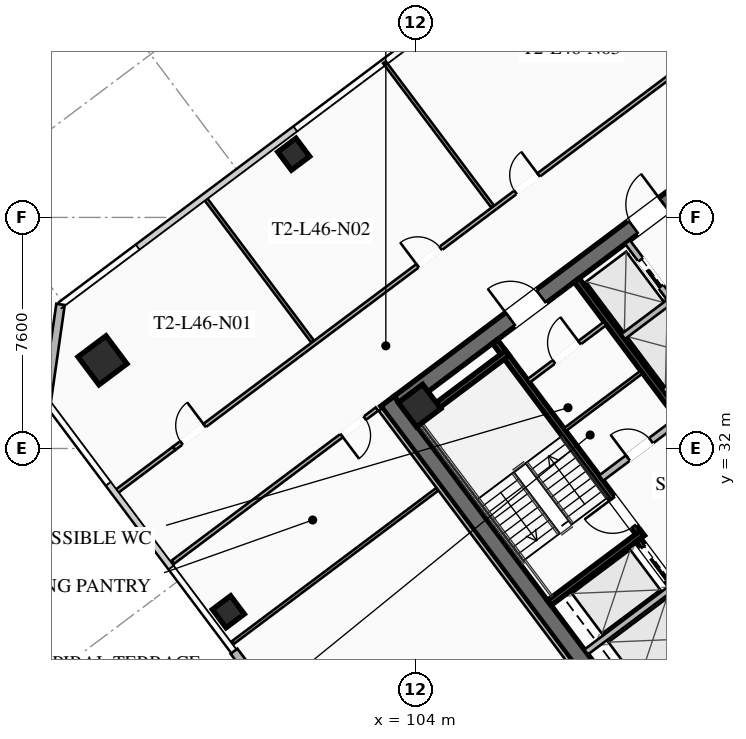
"""IFC4 building model, lengths in metres.
Left out: names, types, materials, properties, quantities, classifications, styles, units other than length and angle.
Written with IfcOpenShell. Run it as: python <this file> out.ifc"""

import sys

from ifc_helpers import new_model, si_unit, direction, frame, frame_2d, origin, origin_2d, place, context, subcontext, project, spatial, rectangle, hollow_rectangle, extrude, element, fill, save


model = new_model("IFC4")
c1 = context("Model", 3, precision=1e-05, world=origin(), true_north=direction((0.0, 1.0)))
c2 = subcontext(c1, "Body", "Model", "MODEL_VIEW")
j1 = project(units=[si_unit("LENGTHUNIT", "METRE"), si_unit("PLANEANGLEUNIT", "RADIAN")], contexts=[c1])
p1 = place(None, origin())
s1 = spatial("IfcSite", under=j1, at=p1, CompositionType="ELEMENT")
p2 = place(p1, origin())
s2 = spatial("IfcBuilding", under=s1, at=p2, CompositionType="ELEMENT")
p3 = place(p2, frame((0.0, 0.0, 171.2)))
s3 = spatial("IfcBuildingStorey", under=s2, at=p3, CompositionType="ELEMENT", Elevation=171.2)
p4 = place(p3, frame((112.436, 21.077, 0.0), z_axis=(0.0, 0.0, 1.0), x_axis=(-0.600005007985, 0.799996243986, 0.0)))
e1 = element("IfcWall", 1, at=p4, inside=s3, PredefinedType="SHEAR", context=c2, shape_type="SweptSolid", body=[
    extrude(rectangle(XDim=15.6, YDim=0.55, at=frame_2d((7.8, 0.0))), origin(), (0.0, 0.0, 1.0), 3.55),
])
p5 = place(p3, frame((103.461, 33.502, 0.0), z_axis=(0.0, 0.0, 1.0), x_axis=(0.799998054672, 0.600002593761, 0.0)))
e2 = element("IfcWall", 2, at=p5, inside=s3, PredefinedType="SHEAR", context=c2, shape_type="SweptSolid", body=[
    extrude(rectangle(XDim=15.06, YDim=0.55, at=frame_2d((7.53, 0.0))), origin(), (0.0, 0.0, 1.0), 3.55),
])
p6 = place(p5, frame((4.58, 0.0, 0.0)))
e3 = element("IfcOpeningElement", 3, at=p6, cuts=e2, PredefinedType="OPENING", context=c2, shape_type="SweptSolid", body=[
    extrude(rectangle(XDim=1.25, YDim=2.25, at=frame_2d((0.625, 1.125))), frame((0.0, 0.285, 0.0), z_axis=(0.0, -1.0, 0.0), x_axis=(1.0, 0.0, 0.0)), (0.0, 0.0, 1.0), 0.57),
])
p7 = place(p5, frame((9.63, 0.0, 0.0)))
e4 = element("IfcOpeningElement", 4, at=p7, cuts=e2, PredefinedType="OPENING", context=c2, shape_type="SweptSolid", body=[
    extrude(rectangle(XDim=1.25, YDim=2.25, at=frame_2d((0.625, 1.125))), frame((0.0, 0.285, 0.0), z_axis=(0.0, -1.0, 0.0), x_axis=(1.0, 0.0, 0.0)), (0.0, 0.0, 1.0), 0.57),
])
p8 = place(p3, frame((104.13, 33.41, 0.0), z_axis=(0.0, 0.0, 1.0), x_axis=(0.799999996291, 0.600000004945, 0.0)))
e5 = element("IfcColumn", 5, at=p8, inside=s3, PredefinedType="COLUMN", context=c2, shape_type="SweptSolid", body=[
    extrude(hollow_rectangle(XDim=1.0, YDim=1.0, WallThickness=0.04, at=origin_2d()), origin(), (0.0, 0.0, 1.0), 3.37),
])
p9 = place(p3, frame((93.7, 34.9, 0.0), z_axis=(0.0, 0.0, 1.0), x_axis=(0.799999996291, 0.600000004945, 0.0)))
e6 = element("IfcColumn", 6, at=p9, inside=s3, PredefinedType="COLUMN", context=c2, shape_type="SweptSolid", body=[
    extrude(hollow_rectangle(XDim=1.15, YDim=1.15, WallThickness=0.045, at=origin_2d()), origin(), (0.0, 0.0, 1.0), 3.37),
])
for number, where, z_axis, x_axis in (
    (7, (99.99, 41.68, 0.0), (0.0, 0.0, 1.0), (0.8, 0.6, 0.0)),
    (8, (97.84, 26.63, 0.0), (0.0, 0.0, 1.0), (0.8, 0.6, 0.0)),
):
    element("IfcColumn", number, at=place(p3, frame(where, z_axis=z_axis, x_axis=x_axis)), inside=s3, PredefinedType="COLUMN", context=c2, shape_type="SweptSolid", body=[
        extrude(hollow_rectangle(XDim=0.75, YDim=0.75, WallThickness=0.032, at=origin_2d()), origin(), (0.0, 0.0, 1.0), 3.37),
    ])
p10 = place(p3, frame((103.126, 18.532, 0.0), z_axis=(0.0, 0.0, 1.0), x_axis=(-0.600004595526, 0.799996553335, 0.0)))
e9 = element("IfcWall", 9, at=p10, inside=s3, PredefinedType="SOLIDWALL", context=c2, shape_type="SweptSolid", body=[
    extrude(rectangle(XDim=8.5, YDim=0.28, at=frame_2d((4.25, 0.0))), origin(), (0.0, 0.0, 1.0), 3.37),
])
p11 = place(p10, frame((3.6, 0.0, 0.0)))
e10 = element("IfcOpeningElement", 10, at=p11, cuts=e9, PredefinedType="OPENING", context=c2, shape_type="SweptSolid", body=[
    extrude(rectangle(XDim=1.3, YDim=2.15, at=frame_2d((0.65, 1.075))), frame((0.0, 0.15, 0.0), z_axis=(0.0, -1.0, 0.0), x_axis=(1.0, 0.0, 0.0)), (0.0, 0.0, 1.0), 0.3),
])
p12 = place(p10, frame((1.46, 0.0, 0.85)))
e11 = element("IfcOpeningElement", 11, at=p12, cuts=e9, PredefinedType="OPENING", context=c2, shape_type="SweptSolid", body=[
    extrude(rectangle(XDim=1.8, YDim=1.92, at=frame_2d((0.9, 0.96))), frame((0.0, 0.15, 0.0), z_axis=(0.0, -1.0, 0.0), x_axis=(1.0, 0.0, 0.0)), (0.0, 0.0, 1.0), 0.3),
])
p13 = place(p3, frame((91.86, 33.52, 0.0), z_axis=(0.0, 0.0, 1.0), x_axis=(0.141410847992, 0.989950994782, 0.0)))
e12 = element("IfcWall", 12, at=p13, inside=s3, PredefinedType="SOLIDWALL", context=c2, shape_type="SweptSolid", body=[
    extrude(rectangle(XDim=3.253, YDim=0.28, at=frame_2d((1.626, 0.0))), origin(), (0.0, 0.0, 1.0), 3.37),
])
p14 = place(p3, frame((111.44, 29.08, 0.0), z_axis=(0.0, 0.0, 1.0), x_axis=(-0.59999029481, 0.8000072788, 0.0)))
e13 = element("IfcWall", 13, at=p14, inside=s3, PredefinedType="SHEAR", context=c2, shape_type="SweptSolid", body=[
    extrude(rectangle(XDim=8.05, YDim=0.2, at=frame_2d((4.025, 0.0))), origin(), (0.0, 0.0, 1.0), 3.37),
])
p15 = place(p14, frame((0.45, 0.0, 0.0)))
e14 = element("IfcOpeningElement", 14, at=p15, cuts=e13, PredefinedType="OPENING", context=c2, shape_type="SweptSolid", body=[
    extrude(rectangle(XDim=1.15, YDim=2.2, at=frame_2d((0.575, 1.1))), frame((0.0, 0.11, 0.0), z_axis=(0.0, -1.0, 0.0), x_axis=(1.0, 0.0, 0.0)), (0.0, 0.0, 1.0), 0.22),
])
for number, where, z_axis, x_axis in (
    (15, (108.396, 26.922, 0.0), (0.0, 0.0, 1.0), (0.8, 0.6, 0.0)),
    (16, (103.956, 32.842, 0.0), (0.0, 0.0, 1.0), (0.8, 0.6, 0.0)),
):
    element("IfcWall", number, at=place(p3, frame(where, z_axis=z_axis, x_axis=x_axis)), inside=s3, PredefinedType="SHEAR", context=c2, shape_type="SweptSolid", body=[
        extrude(rectangle(XDim=3.83, YDim=0.2, at=frame_2d((1.915, 0.0))), origin(), (0.0, 0.0, 1.0), 3.37),
    ])
p16 = place(p3, frame((117.998, 25.936, 0.0), z_axis=(0.0, 0.0, 1.0), x_axis=(-0.600002693989, 0.799997979501, 0.0)))
e17 = element("IfcWall", 17, at=p16, inside=s3, PredefinedType="SHEAR", context=c2, shape_type="SweptSolid", body=[
    extrude(rectangle(XDim=14.5, YDim=0.2, at=frame_2d((7.25, 0.0))), origin(), (0.0, 0.0, 1.0), 3.37),
])
p17 = place(p3, frame((110.104, 31.028, 0.0), z_axis=(0.0, 0.0, 1.0), x_axis=(0.800018601094, 0.59997519774, 0.0)))
e18 = element("IfcWall", 18, at=p17, inside=s3, PredefinedType="SOLIDWALL", context=c2, shape_type="SweptSolid", body=[
    extrude(rectangle(XDim=3.15, YDim=0.22, at=frame_2d((1.575, 0.0))), origin(), (0.0, 0.0, 1.0), 2.723),
])
p18 = place(p17, frame((1.1, 0.0, 0.0)))
e19 = element("IfcOpeningElement", 19, at=p18, cuts=e18, PredefinedType="OPENING", context=c2, shape_type="SweptSolid", body=[
    extrude(rectangle(XDim=0.95, YDim=2.05, at=frame_2d((0.475, 1.025))), frame((0.0, 0.12, 0.0), z_axis=(0.0, -1.0, 0.0), x_axis=(1.0, 0.0, 0.0)), (0.0, 0.0, 1.0), 0.24),
])
p19 = place(p3, frame((115.19, 23.83, 0.0), z_axis=(0.0, 0.0, 1.0), x_axis=(-0.599993943644, 0.800004542231, 0.0)))
e20 = element("IfcWall", 20, at=p19, inside=s3, PredefinedType="SHEAR", context=c2, shape_type="SweptSolid", body=[
    extrude(rectangle(XDim=6.45, YDim=0.2, at=frame_2d((3.225, 0.0))), origin(), (0.0, 0.0, 1.0), 3.37),
])
p20 = place(p19, frame((4.875, 0.0, 0.0)))
e21 = element("IfcOpeningElement", 21, at=p20, cuts=e20, PredefinedType="OPENING", context=c2, shape_type="SweptSolid", body=[
    extrude(rectangle(XDim=1.3, YDim=2.25, at=frame_2d((0.65, 1.125))), frame((0.0, 0.11, 0.0), z_axis=(0.0, -1.0, 0.0), x_axis=(1.0, 0.0, 0.0)), (0.0, 0.0, 1.0), 0.22),
])
p21 = place(p19, frame((2.875, 0.0, 0.0)))
e22 = element("IfcOpeningElement", 22, at=p21, cuts=e20, PredefinedType="OPENING", context=c2, shape_type="SweptSolid", body=[
    extrude(rectangle(XDim=1.3, YDim=2.25, at=frame_2d((0.65, 1.125))), frame((0.0, 0.11, 0.0), z_axis=(0.0, -1.0, 0.0), x_axis=(1.0, 0.0, 0.0)), (0.0, 0.0, 1.0), 0.22),
])
p22 = place(p19, frame((0.675, 0.0, 0.0)))
e23 = element("IfcOpeningElement", 23, at=p22, cuts=e20, PredefinedType="OPENING", context=c2, shape_type="SweptSolid", body=[
    extrude(rectangle(XDim=1.3, YDim=2.25, at=frame_2d((0.65, 1.125))), frame((0.0, 0.11, 0.0), z_axis=(0.0, -1.0, 0.0), x_axis=(1.0, 0.0, 0.0)), (0.0, 0.0, 1.0), 0.22),
])
for number, where, z_axis, x_axis in (
    (24, (110.826, 23.682, 0.0), (0.0, 0.0, 1.0), (0.8, 0.6, 0.0)),
    (25, (109.608, 25.306, 0.0), (0.0, 0.0, 1.0), (0.8, 0.6, 0.0)),
):
    element("IfcWall", number, at=place(p3, frame(where, z_axis=z_axis, x_axis=x_axis)), inside=s3, PredefinedType="SOLIDWALL", context=c2, shape_type="SweptSolid", body=[
        extrude(rectangle(XDim=3.48, YDim=0.2, at=frame_2d((1.74, 0.0))), origin(), (0.0, 0.0, 1.0), 3.37),
    ])
p23 = place(p3, frame((107.71, 34.22, 0.0), z_axis=(0.0, 0.0, 1.0), x_axis=(0.799981399002, 0.60002480053, 0.0)))
e26 = element("IfcWall", 26, at=p23, inside=s3, PredefinedType="PARTITIONING", context=c2, shape_type="SweptSolid", body=[
    extrude(rectangle(XDim=3.15, YDim=0.135, at=frame_2d((1.575, 0.0))), origin(), (0.0, 0.0, 1.0), 2.723),
])
p24 = place(p23, frame((1.05, 0.0, 0.0)))
e27 = element("IfcOpeningElement", 27, at=p24, cuts=e26, PredefinedType="OPENING", context=c2, shape_type="SweptSolid", body=[
    extrude(rectangle(XDim=1.05, YDim=2.2, at=frame_2d((0.525, 1.1))), frame((0.0, 0.077, 0.0), z_axis=(0.0, -1.0, 0.0), x_axis=(1.0, 0.0, 0.0)), (0.0, 0.0, 1.0), 0.155),
])
p25 = place(p3, frame((108.91, 32.62, 0.0), z_axis=(0.0, 0.0, 1.0), x_axis=(0.800018601094, 0.59997519774, 0.0)))
e28 = element("IfcWall", 28, at=p25, inside=s3, PredefinedType="PARTITIONING", context=c2, shape_type="SweptSolid", body=[
    extrude(rectangle(XDim=3.15, YDim=0.11, at=frame_2d((1.575, 0.0))), origin(), (0.0, 0.0, 1.0), 2.723),
])
p26 = place(p3, frame((115.11, 33.27, 0.0), z_axis=(0.0, 0.0, 1.0), x_axis=(-0.600011322243, 0.799991508192, 0.0)))
e29 = element("IfcWall", 29, at=p26, inside=s3, PredefinedType="SOLIDWALL", context=c2, shape_type="SweptSolid", body=[
    extrude(rectangle(XDim=6.9, YDim=0.2, at=frame_2d((3.45, 0.0))), origin(), (0.0, 0.0, 1.0), 3.37),
])
p27 = place(p26, frame((0.575, 0.0, 0.0)))
e30 = element("IfcOpeningElement", 30, at=p27, cuts=e29, PredefinedType="OPENING", context=c2, shape_type="SweptSolid", body=[
    extrude(rectangle(XDim=1.1, YDim=2.2, at=frame_2d((0.55, 1.1))), frame((0.0, 0.11, 0.0), z_axis=(0.0, -1.0, 0.0), x_axis=(1.0, 0.0, 0.0)), (0.0, 0.0, 1.0), 0.22),
])
p28 = place(p26, frame((2.825, 0.0, 0.0)))
e31 = element("IfcOpeningElement", 31, at=p28, cuts=e29, PredefinedType="OPENING", context=c2, shape_type="SweptSolid", body=[
    extrude(rectangle(XDim=1.1, YDim=2.2, at=frame_2d((0.55, 1.1))), frame((0.0, 0.11, 0.0), z_axis=(0.0, -1.0, 0.0), x_axis=(1.0, 0.0, 0.0)), (0.0, 0.0, 1.0), 0.22),
])
p29 = place(p26, frame((5.075, 0.0, 0.0)))
e32 = element("IfcOpeningElement", 32, at=p29, cuts=e29, PredefinedType="OPENING", context=c2, shape_type="SweptSolid", body=[
    extrude(rectangle(XDim=1.1, YDim=2.2, at=frame_2d((0.55, 1.1))), frame((0.0, 0.11, 0.0), z_axis=(0.0, -1.0, 0.0), x_axis=(1.0, 0.0, 0.0)), (0.0, 0.0, 1.0), 0.22),
])
p30 = place(p3, frame((112.176, 33.882, 0.0), z_axis=(0.0, 0.0, 1.0), x_axis=(0.8, 0.6, 0.0)))
e33 = element("IfcWall", 33, at=p30, inside=s3, PredefinedType="SOLIDWALL", context=c2, shape_type="SweptSolid", body=[
    extrude(rectangle(XDim=1.88, YDim=0.2, at=frame_2d((0.94, 0.0))), origin(), (0.0, 0.0, 1.0), 3.37),
])
p31 = place(p3, frame((110.826, 35.682, 0.0), z_axis=(0.0, 0.0, 1.0), x_axis=(0.799984418148, 0.600020775241, 0.0)))
e34 = element("IfcWall", 34, at=p31, inside=s3, PredefinedType="SOLIDWALL", context=c2, shape_type="SweptSolid", body=[
    extrude(rectangle(XDim=1.88, YDim=0.2, at=frame_2d((0.94, 0.0))), origin(), (0.0, 0.0, 1.0), 3.37),
])
p32 = place(p3, frame((96.058, 32.006, 0.0), z_axis=(0.0, 0.0, 1.0), x_axis=(0.8, 0.6, 0.0)))
e35 = element("IfcWall", 35, at=p32, inside=s3, PredefinedType="PARTITIONING", context=c2, shape_type="SweptSolid", body=[
    extrude(rectangle(XDim=28.7, YDim=0.135, at=frame_2d((14.35, 0.0))), origin(), (0.0, 0.0, 1.0), 2.723),
])
p33 = place(p32, frame((0.3, 0.0, 0.0)))
e36 = element("IfcOpeningElement", 36, at=p33, cuts=e35, PredefinedType="OPENING", context=c2, shape_type="SweptSolid", body=[
    extrude(rectangle(XDim=0.95, YDim=2.05, at=frame_2d((0.475, 1.025))), frame((0.0, 0.077, 0.0), z_axis=(0.0, -1.0, 0.0), x_axis=(1.0, 0.0, 0.0)), (0.0, 0.0, 1.0), 0.155),
])
p34 = place(p32, frame((10.01, 0.0, 0.0)))
e37 = element("IfcOpeningElement", 37, at=p34, cuts=e35, PredefinedType="OPENING", context=c2, shape_type="SweptSolid", body=[
    extrude(rectangle(XDim=0.95, YDim=2.05, at=frame_2d((0.475, 1.025))), frame((0.0, 0.077, 0.0), z_axis=(0.0, -1.0, 0.0), x_axis=(1.0, 0.0, 0.0)), (0.0, 0.0, 1.0), 0.155),
])
p35 = place(p32, frame((14.033, 0.0, 0.0)))
e38 = element("IfcOpeningElement", 38, at=p35, cuts=e35, PredefinedType="OPENING", context=c2, shape_type="SweptSolid", body=[
    extrude(rectangle(XDim=0.95, YDim=2.05, at=frame_2d((0.475, 1.025))), frame((0.0, 0.077, 0.0), z_axis=(0.0, -1.0, 0.0), x_axis=(1.0, 0.0, 0.0)), (0.0, 0.0, 1.0), 0.155),
])
p36 = place(p32, frame((27.45, 0.0, 0.0)))
e39 = element("IfcOpeningElement", 39, at=p36, cuts=e35, PredefinedType="OPENING", context=c2, shape_type="SweptSolid", body=[
    extrude(rectangle(XDim=0.95, YDim=2.05, at=frame_2d((0.475, 1.025))), frame((0.0, 0.077, 0.0), z_axis=(0.0, -1.0, 0.0), x_axis=(1.0, 0.0, 0.0)), (0.0, 0.0, 1.0), 0.155),
])
p37 = place(p3, frame((94.114, 30.548, 0.0), z_axis=(0.0, 0.0, 1.0), x_axis=(0.800012055778, 0.599983925293, 0.0)))
e40 = element("IfcWall", 40, at=p37, inside=s3, PredefinedType="PARTITIONING", context=c2, shape_type="SweptSolid", body=[
    extrude(rectangle(XDim=2.43, YDim=0.135, at=frame_2d((1.215, 0.0))), origin(), (0.0, 0.0, 1.0), 2.723),
])
p38 = place(p3, frame((100.61, 35.52, 0.0), z_axis=(0.0, 0.0, 1.0), x_axis=(-0.600019761686, 0.799985178354, 0.0)))
e41 = element("IfcWall", 41, at=p38, inside=s3, PredefinedType="PARTITIONING", context=c2, shape_type="SweptSolid", body=[
    extrude(rectangle(XDim=5.93, YDim=0.11, at=frame_2d((2.965, 0.0))), origin(), (0.0, 0.0, 1.0), 2.723),
])
p39 = place(p3, frame((106.53, 39.96, 0.0), z_axis=(0.0, 0.0, 1.0), x_axis=(-0.6, 0.8, 0.0)))
e42 = element("IfcWall", 42, at=p39, inside=s3, PredefinedType="PARTITIONING", context=c2, shape_type="SweptSolid", body=[
    extrude(rectangle(XDim=5.93, YDim=0.11, at=frame_2d((2.965, 0.0))), origin(), (0.0, 0.0, 1.0), 2.723),
])
p40 = place(p3, frame((112.93, 44.76, 0.0), z_axis=(0.0, 0.0, 1.0), x_axis=(-0.599993412527, 0.800004940562, 0.0)))
e43 = element("IfcWall", 43, at=p40, inside=s3, PredefinedType="PARTITIONING", context=c2, shape_type="SweptSolid", body=[
    extrude(rectangle(XDim=5.93, YDim=0.11, at=frame_2d((2.965, 0.0))), origin(), (0.0, 0.0, 1.0), 2.723),
])
p41 = place(p3, frame((132.11, 31.77, 0.0), z_axis=(0.0, 0.0, 1.0), x_axis=(-0.800003062365, -0.599995916825, 0.0)))
e44 = element("IfcWall", 44, at=p41, inside=s3, PredefinedType="PARTITIONING", context=c2, shape_type="SweptSolid", body=[
    extrude(rectangle(XDim=28.7, YDim=0.135, at=frame_2d((14.35, 0.0))), origin(), (0.0, 0.0, 1.0), 2.723),
])
p42 = place(p41, frame((27.37, 0.0, 0.0)))
e45 = element("IfcOpeningElement", 45, at=p42, cuts=e44, PredefinedType="OPENING", context=c2, shape_type="SweptSolid", body=[
    extrude(rectangle(XDim=0.95, YDim=2.05, at=frame_2d((0.475, 1.025))), frame((0.0, 0.077, 0.0), z_axis=(0.0, -1.0, 0.0), x_axis=(1.0, 0.0, 0.0)), (0.0, 0.0, 1.0), 0.155),
])
p43 = place(p41, frame((17.698, 0.0, 0.0)))
e46 = element("IfcOpeningElement", 46, at=p43, cuts=e44, PredefinedType="OPENING", context=c2, shape_type="SweptSolid", body=[
    extrude(rectangle(XDim=0.95, YDim=2.05, at=frame_2d((0.475, 1.025))), frame((0.0, 0.077, 0.0), z_axis=(0.0, -1.0, 0.0), x_axis=(1.0, 0.0, 0.0)), (0.0, 0.0, 1.0), 0.155),
])
p44 = place(p41, frame((13.639, 0.0, 0.0)))
e47 = element("IfcOpeningElement", 47, at=p44, cuts=e44, PredefinedType="OPENING", context=c2, shape_type="SweptSolid", body=[
    extrude(rectangle(XDim=0.95, YDim=2.05, at=frame_2d((0.475, 1.025))), frame((0.0, 0.077, 0.0), z_axis=(0.0, -1.0, 0.0), x_axis=(1.0, 0.0, 0.0)), (0.0, 0.0, 1.0), 0.155),
])
p45 = place(p41, frame((0.38, 0.0, 0.0)))
e48 = element("IfcOpeningElement", 48, at=p45, cuts=e44, PredefinedType="OPENING", context=c2, shape_type="SweptSolid", body=[
    extrude(rectangle(XDim=0.95, YDim=2.05, at=frame_2d((0.475, 1.025))), frame((0.0, 0.077, 0.0), z_axis=(0.0, -1.0, 0.0), x_axis=(1.0, 0.0, 0.0)), (0.0, 0.0, 1.0), 0.155),
])
p46 = place(p3, frame((112.104, 20.928, 0.0), z_axis=(0.0, 0.0, 1.0), x_axis=(-0.599994940075, 0.800003794918, 0.0)))
e49 = element("IfcWall", 49, at=p46, inside=s3, PredefinedType="PARTITIONING", context=c2, shape_type="SweptSolid", body=[
    extrude(rectangle(XDim=15.44, YDim=0.135, at=frame_2d((7.72, 0.0))), origin(), (0.0, 0.0, 1.0), 2.723),
])
p47 = place(p3, frame((102.728, 33.296, 0.0), z_axis=(0.0, 0.0, 1.0), x_axis=(-0.8, -0.6, 0.0)))
e50 = element("IfcWall", 50, at=p47, inside=s3, PredefinedType="PARTITIONING", context=c2, shape_type="SweptSolid", body=[
    extrude(rectangle(XDim=8.39, YDim=0.135, at=frame_2d((4.195, 0.0))), origin(), (0.0, 0.0, 1.0), 2.723),
])
p48 = place(p47, frame((0.5, 0.0, 0.0)))
e51 = element("IfcOpeningElement", 51, at=p48, cuts=e50, PredefinedType="OPENING", context=c2, shape_type="SweptSolid", body=[
    extrude(rectangle(XDim=0.95, YDim=2.05, at=frame_2d((0.475, 1.025))), frame((0.0, 0.077, 0.0), z_axis=(0.0, -1.0, 0.0), x_axis=(1.0, 0.0, 0.0)), (0.0, 0.0, 1.0), 0.155),
])
p49 = place(p3, frame((97.996, 25.622, 0.0), z_axis=(0.0, 0.0, 1.0), x_axis=(0.8, 0.6, 0.0)))
e52 = element("IfcWall", 52, at=p49, inside=s3, PredefinedType="PARTITIONING", context=c2, shape_type="SweptSolid", body=[
    extrude(rectangle(XDim=8.39, YDim=0.11, at=frame_2d((4.195, 0.0))), origin(), (0.0, 0.0, 1.0), 2.723),
])
p50 = place(p6, origin())
e53 = element("IfcDoor", 53, at=p50, inside=s3, OperationType="SINGLE_SWING_LEFT", PredefinedType="DOOR", context=c2, shape_type="SweptSolid", body=[
    extrude(rectangle(XDim=1.25, YDim=2.25, at=frame_2d((0.625, 1.125))), frame((0.0, 0.025, 0.0), z_axis=(0.0, -1.0, 0.0), x_axis=(1.0, 0.0, 0.0)), (0.0, 0.0, 1.0), 0.05),
])
fill(e3, e53)
p51 = place(p7, origin())
e54 = element("IfcDoor", 54, at=p51, inside=s3, OperationType="SINGLE_SWING_RIGHT", PredefinedType="DOOR", context=c2, shape_type="SweptSolid", body=[
    extrude(rectangle(XDim=1.25, YDim=2.25, at=frame_2d((0.625, 1.125))), frame((0.0, 0.025, 0.0), z_axis=(0.0, -1.0, 0.0), x_axis=(1.0, 0.0, 0.0)), (0.0, 0.0, 1.0), 0.05),
])
fill(e4, e54)
p52 = place(p15, origin())
e55 = element("IfcDoor", 55, at=p52, inside=s3, OperationType="SINGLE_SWING_RIGHT", PredefinedType="DOOR", context=c2, shape_type="SweptSolid", body=[
    extrude(rectangle(XDim=1.15, YDim=2.2, at=frame_2d((0.575, 1.1))), frame((0.0, 0.025, 0.0), z_axis=(0.0, -1.0, 0.0), x_axis=(1.0, 0.0, 0.0)), (0.0, 0.0, 1.0), 0.05),
])
fill(e14, e55)
p53 = place(p24, origin())
e56 = element("IfcDoor", 56, at=p53, inside=s3, OperationType="SINGLE_SWING_RIGHT", PredefinedType="DOOR", context=c2, shape_type="SweptSolid", body=[
    extrude(rectangle(XDim=1.05, YDim=2.2, at=frame_2d((0.525, 1.1))), frame((0.0, 0.025, 0.0), z_axis=(0.0, -1.0, 0.0), x_axis=(1.0, 0.0, 0.0)), (0.0, 0.0, 1.0), 0.05),
])
fill(e27, e56)
p54 = place(p18, origin())
e57 = element("IfcDoor", 57, at=p54, inside=s3, OperationType="SINGLE_SWING_LEFT", PredefinedType="DOOR", context=c2, shape_type="SweptSolid", body=[
    extrude(rectangle(XDim=0.95, YDim=2.05, at=frame_2d((0.475, 1.025))), frame((0.0, 0.025, 0.0), z_axis=(0.0, -1.0, 0.0), x_axis=(1.0, 0.0, 0.0)), (0.0, 0.0, 1.0), 0.05),
])
fill(e19, e57)
p55 = place(p33, origin())
e58 = element("IfcDoor", 58, at=p55, inside=s3, OperationType="SINGLE_SWING_RIGHT", PredefinedType="DOOR", context=c2, shape_type="SweptSolid", body=[
    extrude(rectangle(XDim=0.95, YDim=2.05, at=frame_2d((0.475, 1.025))), frame((0.0, 0.025, 0.0), z_axis=(0.0, -1.0, 0.0), x_axis=(1.0, 0.0, 0.0)), (0.0, 0.0, 1.0), 0.05),
])
fill(e36, e58)
p56 = place(p34, origin())
e59 = element("IfcDoor", 59, at=p56, inside=s3, OperationType="SINGLE_SWING_LEFT", PredefinedType="DOOR", context=c2, shape_type="SweptSolid", body=[
    extrude(rectangle(XDim=0.95, YDim=2.05, at=frame_2d((0.475, 1.025))), frame((0.0, 0.025, 0.0), z_axis=(0.0, -1.0, 0.0), x_axis=(1.0, 0.0, 0.0)), (0.0, 0.0, 1.0), 0.05),
])
fill(e37, e59)
p57 = place(p35, origin())
e60 = element("IfcDoor", 60, at=p57, inside=s3, OperationType="SINGLE_SWING_RIGHT", PredefinedType="DOOR", context=c2, shape_type="SweptSolid", body=[
    extrude(rectangle(XDim=0.95, YDim=2.05, at=frame_2d((0.475, 1.025))), frame((0.0, 0.025, 0.0), z_axis=(0.0, -1.0, 0.0), x_axis=(1.0, 0.0, 0.0)), (0.0, 0.0, 1.0), 0.05),
])
fill(e38, e60)
p58 = place(p48, origin())
e61 = element("IfcDoor", 61, at=p58, inside=s3, OperationType="SINGLE_SWING_RIGHT", PredefinedType="DOOR", context=c2, shape_type="SweptSolid", body=[
    extrude(rectangle(XDim=0.95, YDim=2.05, at=frame_2d((0.475, 1.025))), frame((0.0, 0.025, 0.0), z_axis=(0.0, -1.0, 0.0), x_axis=(1.0, 0.0, 0.0)), (0.0, 0.0, 1.0), 0.05),
])
fill(e51, e61)
p59 = place(p20, origin())
e62 = element("IfcDoor", 62, at=p59, inside=s3, OperationType="SLIDING_TO_LEFT", PredefinedType="DOOR", context=c2, shape_type="SweptSolid", body=[
    extrude(rectangle(XDim=1.3, YDim=2.25, at=frame_2d((0.65, 1.125))), frame((0.0, 0.025, 0.0), z_axis=(0.0, -1.0, 0.0), x_axis=(1.0, 0.0, 0.0)), (0.0, 0.0, 1.0), 0.05),
])
fill(e21, e62)
p60 = place(p29, origin())
e63 = element("IfcDoor", 63, at=p60, inside=s3, OperationType="SLIDING_TO_LEFT", PredefinedType="DOOR", context=c2, shape_type="SweptSolid", body=[
    extrude(rectangle(XDim=1.1, YDim=2.2, at=frame_2d((0.55, 1.1))), frame((0.0, 0.025, 0.0), z_axis=(0.0, -1.0, 0.0), x_axis=(1.0, 0.0, 0.0)), (0.0, 0.0, 1.0), 0.05),
])
fill(e32, e63)
save(model, sys.argv[1])
